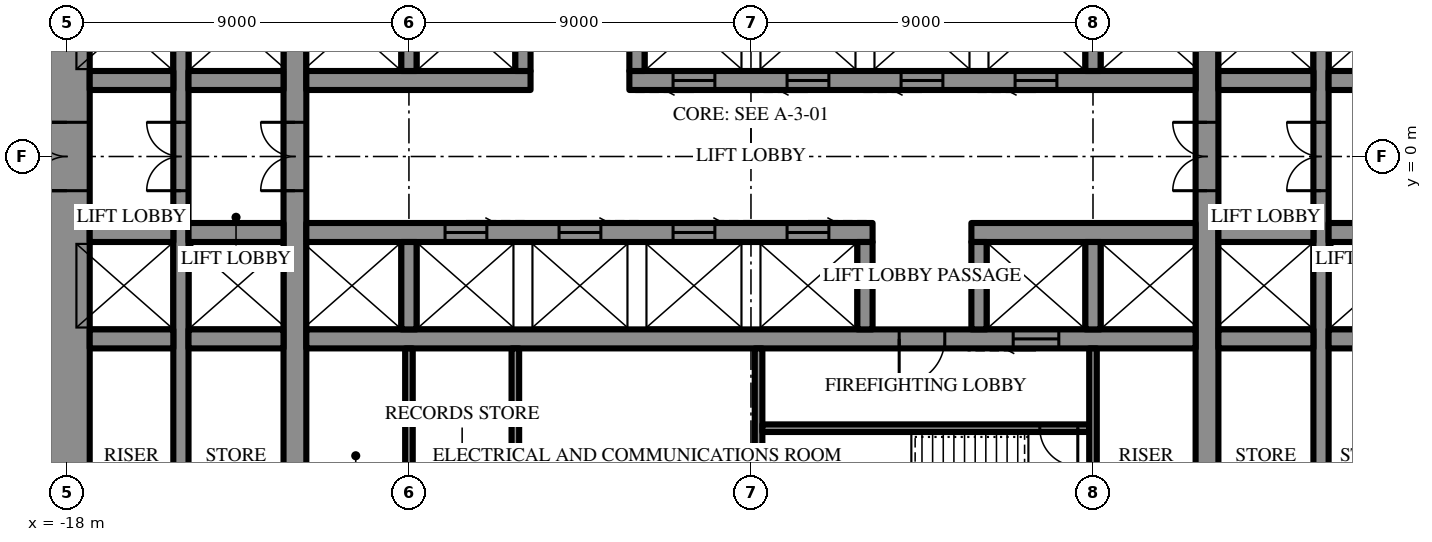
"""IFC4 building model, lengths in metres.
Left out: names, types, materials, properties, quantities, classifications, styles, units other than length and angle.
Written with IfcOpenShell. Run it as: python <this file> out.ifc"""

import sys

from ifc_helpers import new_model, si_unit, direction, frame, frame_2d, origin, place, context, subcontext, project, spatial, rectangle, extrude, element, fill, save


model = new_model("IFC4")
c1 = context("Model", 3, precision=1e-05, world=origin(), true_north=direction((0.0, 1.0)))
c2 = subcontext(c1, "Body", "Model", "MODEL_VIEW")
j1 = project(units=[si_unit("LENGTHUNIT", "METRE"), si_unit("PLANEANGLEUNIT", "RADIAN")], contexts=[c1])
p1 = place(None, origin())
s1 = spatial("IfcSite", under=j1, at=p1, CompositionType="ELEMENT")
p2 = place(p1, origin())
s2 = spatial("IfcBuilding", under=s1, at=p2, CompositionType="ELEMENT")
p3 = place(p2, frame((0.0, 0.0, 40.3)))
s3 = spatial("IfcBuildingStorey", under=s2, at=p3, CompositionType="ELEMENT", Elevation=40.3)
p4 = place(p3, frame((-18.0, 10.7, 0.0), z_axis=(0.0, 0.0, 1.0), x_axis=(0.0, -1.0, 0.0)))
e1 = element("IfcWall", 1, at=p4, inside=s3, PredefinedType="SHEAR", context=c2, shape_type="SweptSolid", body=[
    extrude(rectangle(XDim=21.4, YDim=1.2, at=frame_2d((10.7, 0.0))), origin(), (0.0, 0.0, 1.0), 4.2),
])
p5 = place(p4, frame((9.8, 0.0, 0.0)))
e2 = element("IfcOpeningElement", 2, at=p5, cuts=e1, PredefinedType="OPENING", context=c2, shape_type="SweptSolid", body=[
    extrude(rectangle(XDim=1.8, YDim=2.4, at=frame_2d((0.9, 1.2))), frame((0.0, 0.61, 0.0), z_axis=(0.0, -1.0, 0.0), x_axis=(1.0, 0.0, 0.0)), (0.0, 0.0, 1.0), 1.22),
])
p6 = place(p3, frame((12.0, -10.7, 0.0), z_axis=(0.0, 0.0, 1.0), x_axis=(0.0, 1.0, 0.0)))
e3 = element("IfcWall", 3, at=p6, inside=s3, PredefinedType="SHEAR", context=c2, shape_type="SweptSolid", body=[
    extrude(rectangle(XDim=21.4, YDim=0.6, at=frame_2d((10.7, 0.0))), origin(), (0.0, 0.0, 1.0), 4.2),
])
p7 = place(p6, frame((9.8, 0.0, 0.0)))
e4 = element("IfcOpeningElement", 4, at=p7, cuts=e3, PredefinedType="OPENING", context=c2, shape_type="SweptSolid", body=[
    extrude(rectangle(XDim=1.8, YDim=2.4, at=frame_2d((0.9, 1.2))), frame((0.0, 0.31, 0.0), z_axis=(0.0, -1.0, 0.0), x_axis=(1.0, 0.0, 0.0)), (0.0, 0.0, 1.0), 0.62),
])
p8 = place(p3, frame((-12.0, -10.7, 0.0), z_axis=(0.0, 0.0, 1.0), x_axis=(0.0, 1.0, 0.0)))
e5 = element("IfcWall", 5, at=p8, inside=s3, PredefinedType="SHEAR", context=c2, shape_type="SweptSolid", body=[
    extrude(rectangle(XDim=21.4, YDim=0.6, at=frame_2d((10.7, 0.0))), origin(), (0.0, 0.0, 1.0), 4.2),
])
p9 = place(p8, frame((9.8, 0.0, 0.0)))
e6 = element("IfcOpeningElement", 6, at=p9, cuts=e5, PredefinedType="OPENING", context=c2, shape_type="SweptSolid", body=[
    extrude(rectangle(XDim=1.8, YDim=2.4, at=frame_2d((0.9, 1.2))), frame((0.0, 0.31, 0.0), z_axis=(0.0, -1.0, 0.0), x_axis=(1.0, 0.0, 0.0)), (0.0, 0.0, 1.0), 0.62),
])
p10 = place(p3, frame((15.0, -10.7, 0.0), z_axis=(0.0, 0.0, 1.0), x_axis=(0.0, 1.0, 0.0)))
e7 = element("IfcWall", 7, at=p10, inside=s3, PredefinedType="SHEAR", context=c2, shape_type="SweptSolid", body=[
    extrude(rectangle(XDim=21.4, YDim=0.4, at=frame_2d((10.7, 0.0))), origin(), (0.0, 0.0, 1.0), 4.2),
])
p11 = place(p10, frame((9.8, 0.0, 0.0)))
e8 = element("IfcOpeningElement", 8, at=p11, cuts=e7, PredefinedType="OPENING", context=c2, shape_type="SweptSolid", body=[
    extrude(rectangle(XDim=1.8, YDim=2.4, at=frame_2d((0.9, 1.2))), frame((0.0, 0.21, 0.0), z_axis=(0.0, -1.0, 0.0), x_axis=(1.0, 0.0, 0.0)), (0.0, 0.0, 1.0), 0.42),
])
p12 = place(p3, frame((-15.0, -10.7, 0.0), z_axis=(0.0, 0.0, 1.0), x_axis=(0.0, 1.0, 0.0)))
e9 = element("IfcWall", 9, at=p12, inside=s3, PredefinedType="SHEAR", context=c2, shape_type="SweptSolid", body=[
    extrude(rectangle(XDim=21.4, YDim=0.4, at=frame_2d((10.7, 0.0))), origin(), (0.0, 0.0, 1.0), 4.2),
])
p13 = place(p12, frame((9.8, 0.0, 0.0)))
e10 = element("IfcOpeningElement", 10, at=p13, cuts=e9, PredefinedType="OPENING", context=c2, shape_type="SweptSolid", body=[
    extrude(rectangle(XDim=1.8, YDim=2.4, at=frame_2d((0.9, 1.2))), frame((0.0, 0.21, 0.0), z_axis=(0.0, -1.0, 0.0), x_axis=(1.0, 0.0, 0.0)), (0.0, 0.0, 1.0), 0.42),
])
p14 = place(p3, frame((-17.4, 2.0, 0.0), z_axis=(0.0, 0.0, 1.0), x_axis=(1.0, 0.0, 0.0)))
e11 = element("IfcWall", 11, at=p14, inside=s3, PredefinedType="SHEAR", context=c2, shape_type="SweptSolid", body=[
    extrude(rectangle(XDim=2.2, YDim=0.5, at=frame_2d((1.1, 0.0))), origin(), (0.0, 0.0, 1.0), 4.2),
])
p15 = place(p3, frame((-14.8, 2.0, 0.0), z_axis=(0.0, 0.0, 1.0), x_axis=(1.0, 0.0, 0.0)))
e12 = element("IfcWall", 12, at=p15, inside=s3, PredefinedType="SHEAR", context=c2, shape_type="SweptSolid", body=[
    extrude(rectangle(XDim=2.5, YDim=0.5, at=frame_2d((1.25, 0.0))), origin(), (0.0, 0.0, 1.0), 4.2),
])
p16 = place(p3, frame((-11.7, 2.0, 0.0), z_axis=(0.0, 0.0, 1.0), x_axis=(1.0, 0.0, 0.0)))
e13 = element("IfcWall", 13, at=p16, inside=s3, PredefinedType="SHEAR", context=c2, shape_type="SweptSolid", body=[
    extrude(rectangle(XDim=5.9, YDim=0.5, at=frame_2d((2.95, 0.0))), origin(), (0.0, 0.0, 1.0), 4.2),
])
p17 = place(p3, frame((-3.2, 2.0, 0.0), z_axis=(0.0, 0.0, 1.0), x_axis=(1.0, 0.0, 0.0)))
e14 = element("IfcWall", 14, at=p17, inside=s3, PredefinedType="SHEAR", context=c2, shape_type="SweptSolid", body=[
    extrude(rectangle(XDim=14.9, YDim=0.5, at=frame_2d((7.45, 0.0))), origin(), (0.0, 0.0, 1.0), 4.2),
])
p18 = place(p17, frame((1.15, 0.0, 0.0)))
e15 = element("IfcOpeningElement", 15, at=p18, cuts=e14, PredefinedType="OPENING", context=c2, shape_type="SweptSolid", body=[
    extrude(rectangle(XDim=1.1, YDim=2.2, at=frame_2d((0.55, 1.1))), frame((0.0, 0.26, 0.0), z_axis=(0.0, -1.0, 0.0), x_axis=(1.0, 0.0, 0.0)), (0.0, 0.0, 1.0), 0.52),
])
p19 = place(p17, frame((4.15, 0.0, 0.0)))
e16 = element("IfcOpeningElement", 16, at=p19, cuts=e14, PredefinedType="OPENING", context=c2, shape_type="SweptSolid", body=[
    extrude(rectangle(XDim=1.1, YDim=2.2, at=frame_2d((0.55, 1.1))), frame((0.0, 0.26, 0.0), z_axis=(0.0, -1.0, 0.0), x_axis=(1.0, 0.0, 0.0)), (0.0, 0.0, 1.0), 0.52),
])
p20 = place(p17, frame((7.15, 0.0, 0.0)))
e17 = element("IfcOpeningElement", 17, at=p20, cuts=e14, PredefinedType="OPENING", context=c2, shape_type="SweptSolid", body=[
    extrude(rectangle(XDim=1.1, YDim=2.2, at=frame_2d((0.55, 1.1))), frame((0.0, 0.26, 0.0), z_axis=(0.0, -1.0, 0.0), x_axis=(1.0, 0.0, 0.0)), (0.0, 0.0, 1.0), 0.52),
])
p21 = place(p17, frame((10.15, 0.0, 0.0)))
e18 = element("IfcOpeningElement", 18, at=p21, cuts=e14, PredefinedType="OPENING", context=c2, shape_type="SweptSolid", body=[
    extrude(rectangle(XDim=1.1, YDim=2.2, at=frame_2d((0.55, 1.1))), frame((0.0, 0.26, 0.0), z_axis=(0.0, -1.0, 0.0), x_axis=(1.0, 0.0, 0.0)), (0.0, 0.0, 1.0), 0.52),
])
p22 = place(p3, frame((12.3, 2.0, 0.0), z_axis=(0.0, 0.0, 1.0), x_axis=(1.0, 0.0, 0.0)))
e19 = element("IfcWall", 19, at=p22, inside=s3, PredefinedType="SHEAR", context=c2, shape_type="SweptSolid", body=[
    extrude(rectangle(XDim=2.5, YDim=0.5, at=frame_2d((1.25, 0.0))), origin(), (0.0, 0.0, 1.0), 4.2),
])
p23 = place(p3, frame((15.2, 2.0, 0.0), z_axis=(0.0, 0.0, 1.0), x_axis=(1.0, 0.0, 0.0)))
e20 = element("IfcWall", 20, at=p23, inside=s3, PredefinedType="SHEAR", context=c2, shape_type="SweptSolid", body=[
    extrude(rectangle(XDim=2.2, YDim=0.5, at=frame_2d((1.1, 0.0))), origin(), (0.0, 0.0, 1.0), 4.2),
])
for number, where, z_axis, x_axis in (
    (21, (-9.0, 2.25, 0.0), (0.0, 0.0, 1.0), (0.0, 1.0, 0.0)),
    (22, (-6.0, 2.25, 0.0), (0.0, 0.0, 1.0), (0.0, 1.0, 0.0)),
    (23, (-3.0, 2.25, 0.0), (0.0, 0.0, 1.0), (0.0, 1.0, 0.0)),
    (24, (9.0, 2.25, 0.0), (0.0, 0.0, 1.0), (0.0, 1.0, 0.0)),
):
    element("IfcWall", number, at=place(p3, frame(where, z_axis=z_axis, x_axis=x_axis)), inside=s3, PredefinedType="SHEAR", context=c2, shape_type="SweptSolid", body=[
        extrude(rectangle(XDim=2.3, YDim=0.4, at=frame_2d((1.15, 0.0))), origin(), (0.0, 0.0, 1.0), 4.2),
    ])
p24 = place(p3, frame((17.4, -2.0, 0.0), z_axis=(0.0, 0.0, 1.0), x_axis=(-1.0, 0.0, 0.0)))
e25 = element("IfcWall", 25, at=p24, inside=s3, PredefinedType="SHEAR", context=c2, shape_type="SweptSolid", body=[
    extrude(rectangle(XDim=2.2, YDim=0.5, at=frame_2d((1.1, 0.0))), origin(), (0.0, 0.0, 1.0), 4.2),
])
p25 = place(p3, frame((14.8, -2.0, 0.0), z_axis=(0.0, 0.0, 1.0), x_axis=(-1.0, 0.0, 0.0)))
e26 = element("IfcWall", 26, at=p25, inside=s3, PredefinedType="SHEAR", context=c2, shape_type="SweptSolid", body=[
    extrude(rectangle(XDim=2.5, YDim=0.5, at=frame_2d((1.25, 0.0))), origin(), (0.0, 0.0, 1.0), 4.2),
])
p26 = place(p3, frame((11.7, -2.0, 0.0), z_axis=(0.0, 0.0, 1.0), x_axis=(-1.0, 0.0, 0.0)))
e27 = element("IfcWall", 27, at=p26, inside=s3, PredefinedType="SHEAR", context=c2, shape_type="SweptSolid", body=[
    extrude(rectangle(XDim=5.9, YDim=0.5, at=frame_2d((2.95, 0.0))), origin(), (0.0, 0.0, 1.0), 4.2),
])
p27 = place(p3, frame((3.2, -2.0, 0.0), z_axis=(0.0, 0.0, 1.0), x_axis=(-1.0, 0.0, 0.0)))
e28 = element("IfcWall", 28, at=p27, inside=s3, PredefinedType="SHEAR", context=c2, shape_type="SweptSolid", body=[
    extrude(rectangle(XDim=14.9, YDim=0.5, at=frame_2d((7.45, 0.0))), origin(), (0.0, 0.0, 1.0), 4.2),
])
p28 = place(p27, frame((1.15, 0.0, 0.0)))
e29 = element("IfcOpeningElement", 29, at=p28, cuts=e28, PredefinedType="OPENING", context=c2, shape_type="SweptSolid", body=[
    extrude(rectangle(XDim=1.1, YDim=2.2, at=frame_2d((0.55, 1.1))), frame((0.0, 0.26, 0.0), z_axis=(0.0, -1.0, 0.0), x_axis=(1.0, 0.0, 0.0)), (0.0, 0.0, 1.0), 0.52),
])
p29 = place(p27, frame((4.15, 0.0, 0.0)))
e30 = element("IfcOpeningElement", 30, at=p29, cuts=e28, PredefinedType="OPENING", context=c2, shape_type="SweptSolid", body=[
    extrude(rectangle(XDim=1.1, YDim=2.2, at=frame_2d((0.55, 1.1))), frame((0.0, 0.26, 0.0), z_axis=(0.0, -1.0, 0.0), x_axis=(1.0, 0.0, 0.0)), (0.0, 0.0, 1.0), 0.52),
])
p30 = place(p27, frame((7.15, 0.0, 0.0)))
e31 = element("IfcOpeningElement", 31, at=p30, cuts=e28, PredefinedType="OPENING", context=c2, shape_type="SweptSolid", body=[
    extrude(rectangle(XDim=1.1, YDim=2.2, at=frame_2d((0.55, 1.1))), frame((0.0, 0.26, 0.0), z_axis=(0.0, -1.0, 0.0), x_axis=(1.0, 0.0, 0.0)), (0.0, 0.0, 1.0), 0.52),
])
p31 = place(p27, frame((10.15, 0.0, 0.0)))
e32 = element("IfcOpeningElement", 32, at=p31, cuts=e28, PredefinedType="OPENING", context=c2, shape_type="SweptSolid", body=[
    extrude(rectangle(XDim=1.1, YDim=2.2, at=frame_2d((0.55, 1.1))), frame((0.0, 0.26, 0.0), z_axis=(0.0, -1.0, 0.0), x_axis=(1.0, 0.0, 0.0)), (0.0, 0.0, 1.0), 0.52),
])
p32 = place(p3, frame((-12.3, -2.0, 0.0), z_axis=(0.0, 0.0, 1.0), x_axis=(-1.0, 0.0, 0.0)))
e33 = element("IfcWall", 33, at=p32, inside=s3, PredefinedType="SHEAR", context=c2, shape_type="SweptSolid", body=[
    extrude(rectangle(XDim=2.5, YDim=0.5, at=frame_2d((1.25, 0.0))), origin(), (0.0, 0.0, 1.0), 4.2),
])
for number, where, z_axis, x_axis in (
    (34, (-15.2, -2.0, 0.0), (0.0, 0.0, 1.0), (-1.0, 0.0, 0.0)),
    (35, (17.4, -4.8, 0.0), (0.0, 0.0, 1.0), (-1.0, 0.0, 0.0)),
):
    element("IfcWall", number, at=place(p3, frame(where, z_axis=z_axis, x_axis=x_axis)), inside=s3, PredefinedType="SHEAR", context=c2, shape_type="SweptSolid", body=[
        extrude(rectangle(XDim=2.2, YDim=0.5, at=frame_2d((1.1, 0.0))), origin(), (0.0, 0.0, 1.0), 4.2),
    ])
p33 = place(p3, frame((14.8, -4.8, 0.0), z_axis=(0.0, 0.0, 1.0), x_axis=(-1.0, 0.0, 0.0)))
e36 = element("IfcWall", 36, at=p33, inside=s3, PredefinedType="SHEAR", context=c2, shape_type="SweptSolid", body=[
    extrude(rectangle(XDim=2.5, YDim=0.5, at=frame_2d((1.25, 0.0))), origin(), (0.0, 0.0, 1.0), 4.2),
])
p34 = place(p3, frame((11.7, -4.8, 0.0), z_axis=(0.0, 0.0, 1.0), x_axis=(-1.0, 0.0, 0.0)))
e37 = element("IfcWall", 37, at=p34, inside=s3, PredefinedType="SHEAR", context=c2, shape_type="SweptSolid", body=[
    extrude(rectangle(XDim=23.4, YDim=0.5, at=frame_2d((11.7, 0.0))), origin(), (0.0, 0.0, 1.0), 4.2),
])
p35 = place(p34, frame((6.6, 0.0, 0.0)))
e38 = element("IfcOpeningElement", 38, at=p35, cuts=e37, PredefinedType="OPENING", context=c2, shape_type="SweptSolid", body=[
    extrude(rectangle(XDim=1.2, YDim=2.2, at=frame_2d((0.6, 1.1))), frame((0.0, 0.26, 0.0), z_axis=(0.0, -1.0, 0.0), x_axis=(1.0, 0.0, 0.0)), (0.0, 0.0, 1.0), 0.52),
])
p36 = place(p34, frame((3.6, 0.0, 0.0)))
e39 = element("IfcOpeningElement", 39, at=p36, cuts=e37, PredefinedType="OPENING", context=c2, shape_type="SweptSolid", body=[
    extrude(rectangle(XDim=1.2, YDim=2.2, at=frame_2d((0.6, 1.1))), frame((0.0, 0.26, 0.0), z_axis=(0.0, -1.0, 0.0), x_axis=(1.0, 0.0, 0.0)), (0.0, 0.0, 1.0), 0.52),
])
p37 = place(p3, frame((-12.3, -4.8, 0.0), z_axis=(0.0, 0.0, 1.0), x_axis=(-1.0, 0.0, 0.0)))
e40 = element("IfcWall", 40, at=p37, inside=s3, PredefinedType="SHEAR", context=c2, shape_type="SweptSolid", body=[
    extrude(rectangle(XDim=2.5, YDim=0.5, at=frame_2d((1.25, 0.0))), origin(), (0.0, 0.0, 1.0), 4.2),
])
p38 = place(p3, frame((-15.2, -4.8, 0.0), z_axis=(0.0, 0.0, 1.0), x_axis=(-1.0, 0.0, 0.0)))
e41 = element("IfcWall", 41, at=p38, inside=s3, PredefinedType="SHEAR", context=c2, shape_type="SweptSolid", body=[
    extrude(rectangle(XDim=2.2, YDim=0.5, at=frame_2d((1.1, 0.0))), origin(), (0.0, 0.0, 1.0), 4.2),
])
for number, where, z_axis, x_axis in (
    (42, (9.0, -2.25, 0.0), (0.0, 0.0, 1.0), (0.0, -1.0, 0.0)),
    (43, (6.0, -2.25, 0.0), (0.0, 0.0, 1.0), (0.0, -1.0, 0.0)),
    (44, (3.0, -2.25, 0.0), (0.0, 0.0, 1.0), (0.0, -1.0, 0.0)),
    (45, (-9.0, -2.25, 0.0), (0.0, 0.0, 1.0), (0.0, -1.0, 0.0)),
):
    element("IfcWall", number, at=place(p3, frame(where, z_axis=z_axis, x_axis=x_axis)), inside=s3, PredefinedType="SHEAR", context=c2, shape_type="SweptSolid", body=[
        extrude(rectangle(XDim=2.3, YDim=0.4, at=frame_2d((1.15, 0.0))), origin(), (0.0, 0.0, 1.0), 4.2),
    ])
p39 = place(p3, frame((0.2, -5.05, 0.0), z_axis=(0.0, 0.0, 1.0), x_axis=(0.0, -1.0, 0.0)))
e46 = element("IfcWall", 46, at=p39, inside=s3, PredefinedType="SHEAR", context=c2, shape_type="SweptSolid", body=[
    extrude(rectangle(XDim=5.65, YDim=0.2, at=frame_2d((2.825, 0.0))), origin(), (0.0, 0.0, 1.0), 4.2),
])
p40 = place(p3, frame((8.9, -7.15, 0.0), z_axis=(0.0, 0.0, 1.0), x_axis=(-1.0, 0.0, 0.0)))
e47 = element("IfcWall", 47, at=p40, inside=s3, PredefinedType="SHEAR", context=c2, shape_type="SweptSolid", body=[
    extrude(rectangle(XDim=8.6, YDim=0.2, at=frame_2d((4.3, 0.0))), origin(), (0.0, 0.0, 1.0), 4.2),
])
p41 = place(p40, frame((0.3, 0.0, 0.0)))
e48 = element("IfcOpeningElement", 48, at=p41, cuts=e47, PredefinedType="OPENING", context=c2, shape_type="SweptSolid", body=[
    extrude(rectangle(XDim=1.0, YDim=2.2, at=frame_2d((0.5, 1.1))), frame((0.0, 0.11, 0.0), z_axis=(0.0, -1.0, 0.0), x_axis=(1.0, 0.0, 0.0)), (0.0, 0.0, 1.0), 0.22),
])
for number, where, z_axis, x_axis in (
    (49, (9.0, -5.05, 0.0), (0.0, 0.0, 1.0), (0.0, -1.0, 0.0)),
    (50, (-9.0, -5.05, 0.0), (0.0, 0.0, 1.0), (0.0, -1.0, 0.0)),
    (51, (-6.2, -5.05, 0.0), (0.0, 0.0, 1.0), (0.0, -1.0, 0.0)),
):
    element("IfcWall", number, at=place(p3, frame(where, z_axis=z_axis, x_axis=x_axis)), inside=s3, PredefinedType="PARTITIONING", context=c2, shape_type="SweptSolid", body=[
        extrude(rectangle(XDim=5.65, YDim=0.2, at=frame_2d((2.825, 0.0))), origin(), (0.0, 0.0, 1.0), 4.0),
    ])
p42 = place(p5, frame((1.8, 0.0, 0.0), z_axis=(0.0, 0.0, 1.0), x_axis=(-1.0, 0.0, 0.0)))
e52 = element("IfcDoor", 52, at=p42, inside=s3, OperationType="DOUBLE_DOOR_SINGLE_SWING", PredefinedType="DOOR", context=c2, shape_type="SweptSolid", body=[
    extrude(rectangle(XDim=1.8, YDim=2.4, at=frame_2d((0.9, 1.2))), frame((0.0, 0.025, 0.0), z_axis=(0.0, -1.0, 0.0), x_axis=(1.0, 0.0, 0.0)), (0.0, 0.0, 1.0), 0.05),
])
fill(e2, e52)
p43 = place(p35, origin())
e53 = element("IfcDoor", 53, at=p43, inside=s3, OperationType="SINGLE_SWING_LEFT", PredefinedType="DOOR", context=c2, shape_type="SweptSolid", body=[
    extrude(rectangle(XDim=1.2, YDim=2.2, at=frame_2d((0.6, 1.1))), frame((0.0, 0.025, 0.0), z_axis=(0.0, -1.0, 0.0), x_axis=(1.0, 0.0, 0.0)), (0.0, 0.0, 1.0), 0.05),
])
fill(e38, e53)
p44 = place(p41, origin())
e54 = element("IfcDoor", 54, at=p44, inside=s3, OperationType="SINGLE_SWING_RIGHT", PredefinedType="DOOR", context=c2, shape_type="SweptSolid", body=[
    extrude(rectangle(XDim=1.0, YDim=2.2, at=frame_2d((0.5, 1.1))), frame((0.0, 0.025, 0.0), z_axis=(0.0, -1.0, 0.0), x_axis=(1.0, 0.0, 0.0)), (0.0, 0.0, 1.0), 0.05),
])
fill(e48, e54)
p45 = place(p7, origin())
e55 = element("IfcDoor", 55, at=p45, inside=s3, OperationType="DOUBLE_DOOR_SINGLE_SWING", PredefinedType="DOOR", context=c2, shape_type="SweptSolid", body=[
    extrude(rectangle(XDim=1.8, YDim=2.4, at=frame_2d((0.9, 1.2))), frame((0.0, 0.025, 0.0), z_axis=(0.0, -1.0, 0.0), x_axis=(1.0, 0.0, 0.0)), (0.0, 0.0, 1.0), 0.05),
])
fill(e4, e55)
p46 = place(p9, origin())
e56 = element("IfcDoor", 56, at=p46, inside=s3, OperationType="DOUBLE_DOOR_SINGLE_SWING", PredefinedType="DOOR", context=c2, shape_type="SweptSolid", body=[
    extrude(rectangle(XDim=1.8, YDim=2.4, at=frame_2d((0.9, 1.2))), frame((0.0, 0.025, 0.0), z_axis=(0.0, -1.0, 0.0), x_axis=(1.0, 0.0, 0.0)), (0.0, 0.0, 1.0), 0.05),
])
fill(e6, e56)
p47 = place(p11, origin())
e57 = element("IfcDoor", 57, at=p47, inside=s3, OperationType="DOUBLE_DOOR_SINGLE_SWING", PredefinedType="DOOR", context=c2, shape_type="SweptSolid", body=[
    extrude(rectangle(XDim=1.8, YDim=2.4, at=frame_2d((0.9, 1.2))), frame((0.0, 0.025, 0.0), z_axis=(0.0, -1.0, 0.0), x_axis=(1.0, 0.0, 0.0)), (0.0, 0.0, 1.0), 0.05),
])
fill(e8, e57)
p48 = place(p13, origin())
e58 = element("IfcDoor", 58, at=p48, inside=s3, OperationType="DOUBLE_DOOR_SINGLE_SWING", PredefinedType="DOOR", context=c2, shape_type="SweptSolid", body=[
    extrude(rectangle(XDim=1.8, YDim=2.4, at=frame_2d((0.9, 1.2))), frame((0.0, 0.025, 0.0), z_axis=(0.0, -1.0, 0.0), x_axis=(1.0, 0.0, 0.0)), (0.0, 0.0, 1.0), 0.05),
])
fill(e10, e58)
p49 = place(p18, frame((1.1, 0.0, 0.0), z_axis=(0.0, 0.0, 1.0), x_axis=(-1.0, 0.0, 0.0)))
e59 = element("IfcDoor", 59, at=p49, inside=s3, OperationType="SLIDING_TO_LEFT", PredefinedType="DOOR", context=c2, shape_type="SweptSolid", body=[
    extrude(rectangle(XDim=1.1, YDim=2.2, at=frame_2d((0.55, 1.1))), frame((0.0, 0.025, 0.0), z_axis=(0.0, -1.0, 0.0), x_axis=(1.0, 0.0, 0.0)), (0.0, 0.0, 1.0), 0.05),
])
fill(e15, e59)
p50 = place(p19, frame((1.1, 0.0, 0.0), z_axis=(0.0, 0.0, 1.0), x_axis=(-1.0, 0.0, 0.0)))
e60 = element("IfcDoor", 60, at=p50, inside=s3, OperationType="SLIDING_TO_LEFT", PredefinedType="DOOR", context=c2, shape_type="SweptSolid", body=[
    extrude(rectangle(XDim=1.1, YDim=2.2, at=frame_2d((0.55, 1.1))), frame((0.0, 0.025, 0.0), z_axis=(0.0, -1.0, 0.0), x_axis=(1.0, 0.0, 0.0)), (0.0, 0.0, 1.0), 0.05),
])
fill(e16, e60)
p51 = place(p20, frame((1.1, 0.0, 0.0), z_axis=(0.0, 0.0, 1.0), x_axis=(-1.0, 0.0, 0.0)))
e61 = element("IfcDoor", 61, at=p51, inside=s3, OperationType="SLIDING_TO_LEFT", PredefinedType="DOOR", context=c2, shape_type="SweptSolid", body=[
    extrude(rectangle(XDim=1.1, YDim=2.2, at=frame_2d((0.55, 1.1))), frame((0.0, 0.025, 0.0), z_axis=(0.0, -1.0, 0.0), x_axis=(1.0, 0.0, 0.0)), (0.0, 0.0, 1.0), 0.05),
])
fill(e17, e61)
p52 = place(p21, frame((1.1, 0.0, 0.0), z_axis=(0.0, 0.0, 1.0), x_axis=(-1.0, 0.0, 0.0)))
e62 = element("IfcDoor", 62, at=p52, inside=s3, OperationType="SLIDING_TO_LEFT", PredefinedType="DOOR", context=c2, shape_type="SweptSolid", body=[
    extrude(rectangle(XDim=1.1, YDim=2.2, at=frame_2d((0.55, 1.1))), frame((0.0, 0.025, 0.0), z_axis=(0.0, -1.0, 0.0), x_axis=(1.0, 0.0, 0.0)), (0.0, 0.0, 1.0), 0.05),
])
fill(e18, e62)
p53 = place(p36, origin())
e63 = element("IfcDoor", 63, at=p53, inside=s3, OperationType="SLIDING_TO_LEFT", PredefinedType="DOOR", context=c2, shape_type="SweptSolid", body=[
    extrude(rectangle(XDim=1.2, YDim=2.2, at=frame_2d((0.6, 1.1))), frame((0.0, 0.025, 0.0), z_axis=(0.0, -1.0, 0.0), x_axis=(1.0, 0.0, 0.0)), (0.0, 0.0, 1.0), 0.05),
])
fill(e39, e63)
p54 = place(p28, frame((1.1, 0.0, 0.0), z_axis=(0.0, 0.0, 1.0), x_axis=(-1.0, 0.0, 0.0)))
e64 = element("IfcDoor", 64, at=p54, inside=s3, OperationType="SLIDING_TO_LEFT", PredefinedType="DOOR", context=c2, shape_type="SweptSolid", body=[
    extrude(rectangle(XDim=1.1, YDim=2.2, at=frame_2d((0.55, 1.1))), frame((0.0, 0.025, 0.0), z_axis=(0.0, -1.0, 0.0), x_axis=(1.0, 0.0, 0.0)), (0.0, 0.0, 1.0), 0.05),
])
fill(e29, e64)
p55 = place(p29, frame((1.1, 0.0, 0.0), z_axis=(0.0, 0.0, 1.0), x_axis=(-1.0, 0.0, 0.0)))
e65 = element("IfcDoor", 65, at=p55, inside=s3, OperationType="SLIDING_TO_LEFT", PredefinedType="DOOR", context=c2, shape_type="SweptSolid", body=[
    extrude(rectangle(XDim=1.1, YDim=2.2, at=frame_2d((0.55, 1.1))), frame((0.0, 0.025, 0.0), z_axis=(0.0, -1.0, 0.0), x_axis=(1.0, 0.0, 0.0)), (0.0, 0.0, 1.0), 0.05),
])
fill(e30, e65)
p56 = place(p30, frame((1.1, 0.0, 0.0), z_axis=(0.0, 0.0, 1.0), x_axis=(-1.0, 0.0, 0.0)))
e66 = element("IfcDoor", 66, at=p56, inside=s3, OperationType="SLIDING_TO_LEFT", PredefinedType="DOOR", context=c2, shape_type="SweptSolid", body=[
    extrude(rectangle(XDim=1.1, YDim=2.2, at=frame_2d((0.55, 1.1))), frame((0.0, 0.025, 0.0), z_axis=(0.0, -1.0, 0.0), x_axis=(1.0, 0.0, 0.0)), (0.0, 0.0, 1.0), 0.05),
])
fill(e31, e66)
p57 = place(p31, frame((1.1, 0.0, 0.0), z_axis=(0.0, 0.0, 1.0), x_axis=(-1.0, 0.0, 0.0)))
e67 = element("IfcDoor", 67, at=p57, inside=s3, OperationType="SLIDING_TO_LEFT", PredefinedType="DOOR", context=c2, shape_type="SweptSolid", body=[
    extrude(rectangle(XDim=1.1, YDim=2.2, at=frame_2d((0.55, 1.1))), frame((0.0, 0.025, 0.0), z_axis=(0.0, -1.0, 0.0), x_axis=(1.0, 0.0, 0.0)), (0.0, 0.0, 1.0), 0.05),
])
fill(e32, e67)
save(model, sys.argv[1])
